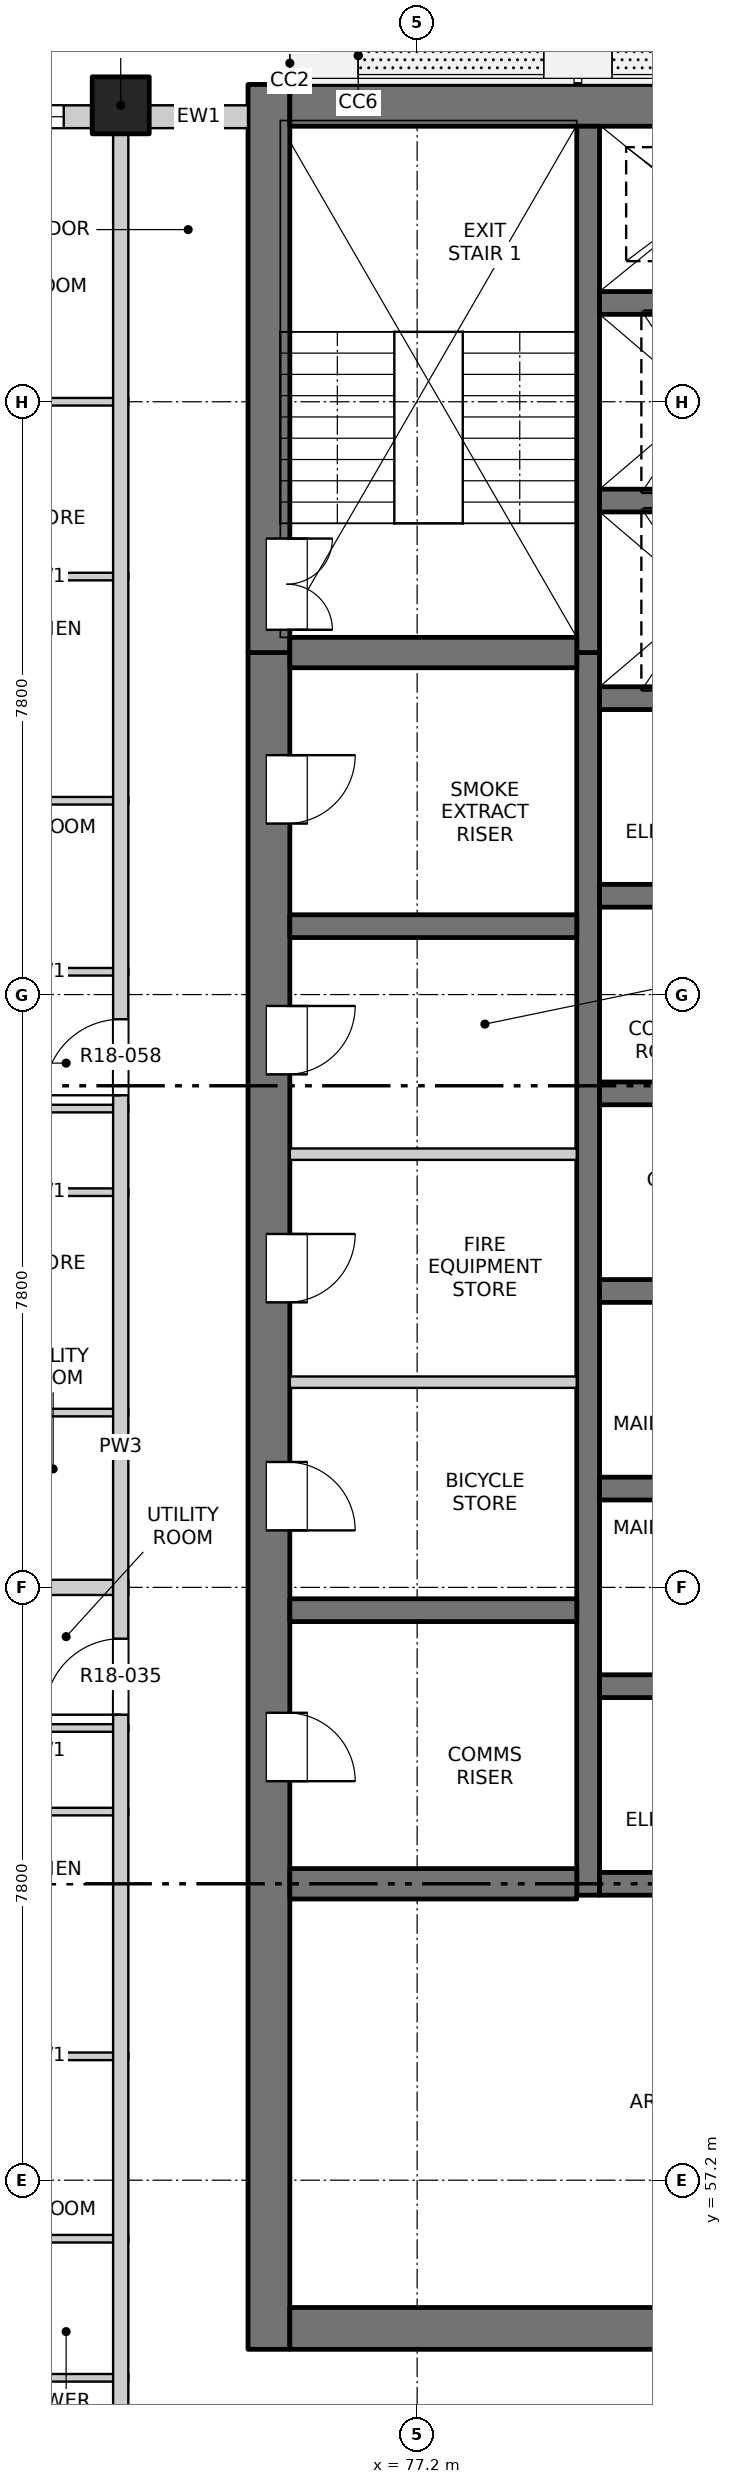
"""IFC4 building model, lengths in metres.
Left out: names, types, materials, properties, quantities, classifications, styles, units other than length and angle.
Written with IfcOpenShell. Run it as: python <this file> out.ifc"""

import sys

from ifc_helpers import new_model, si_unit, direction, frame, frame_2d, origin, origin_2d, place, context, subcontext, project, spatial, rectangle, extrude, element, fill, save


model = new_model("IFC4")
c1 = context("Model", 3, precision=1e-05, world=origin(), true_north=direction((0.0, 1.0)))
c2 = subcontext(c1, "Body", "Model", "MODEL_VIEW")
j1 = project(units=[si_unit("LENGTHUNIT", "METRE"), si_unit("PLANEANGLEUNIT", "RADIAN")], contexts=[c1])
p1 = place(None, origin())
s1 = spatial("IfcSite", under=j1, at=p1, CompositionType="ELEMENT")
p2 = place(p1, origin())
s2 = spatial("IfcBuilding", under=s1, at=p2, CompositionType="ELEMENT")
p3 = place(p2, frame((0.0, 0.0, 186.0)))
s3 = spatial("IfcBuildingStorey", under=s2, at=p3, CompositionType="ELEMENT", Elevation=186.0)
p4 = place(p3, frame((73.3, 84.5, -0.25), z_axis=(0.0, 0.0, 1.0), x_axis=(1.0, 0.0, 0.0)))
e1 = element("IfcColumn", 1, at=p4, inside=s3, PredefinedType="COLUMN", context=c2, shape_type="SweptSolid", body=[
    extrude(rectangle(XDim=0.75, YDim=0.75, at=origin_2d()), origin(), (0.0, 0.0, 1.0), 3.4),
])
p5 = place(p3, frame((75.25, 54.975, -0.25), z_axis=(0.0, 0.0, 1.0), x_axis=(0.0, 1.0, 0.0)))
e2 = element("IfcWall", 2, at=p5, inside=s3, PredefinedType="SOLIDWALL", context=c2, shape_type="SweptSolid", body=[
    extrude(rectangle(XDim=22.325, YDim=0.55, at=frame_2d((11.163, 0.0))), origin(), (0.0, 0.0, 1.0), 3.4),
])
p6 = place(p5, frame((7.475, 0.0, 0.25)))
e3 = element("IfcOpeningElement", 3, at=p6, cuts=e2, PredefinedType="OPENING", context=c2, shape_type="SweptSolid", body=[
    extrude(rectangle(XDim=0.9, YDim=2.1, at=frame_2d((0.45, 1.05))), frame((0.0, 0.285, 0.0), z_axis=(0.0, -1.0, 0.0), x_axis=(1.0, 0.0, 0.0)), (0.0, 0.0, 1.0), 0.57),
])
p7 = place(p5, frame((10.775, 0.0, 0.25)))
e4 = element("IfcOpeningElement", 4, at=p7, cuts=e2, PredefinedType="OPENING", context=c2, shape_type="SweptSolid", body=[
    extrude(rectangle(XDim=0.9, YDim=2.1, at=frame_2d((0.45, 1.05))), frame((0.0, 0.285, 0.0), z_axis=(0.0, -1.0, 0.0), x_axis=(1.0, 0.0, 0.0)), (0.0, 0.0, 1.0), 0.57),
])
p8 = place(p5, frame((13.775, 0.0, 0.25)))
e5 = element("IfcOpeningElement", 5, at=p8, cuts=e2, PredefinedType="OPENING", context=c2, shape_type="SweptSolid", body=[
    extrude(rectangle(XDim=0.9, YDim=2.1, at=frame_2d((0.45, 1.05))), frame((0.0, 0.285, 0.0), z_axis=(0.0, -1.0, 0.0), x_axis=(1.0, 0.0, 0.0)), (0.0, 0.0, 1.0), 0.57),
])
p9 = place(p5, frame((16.775, 0.0, 0.25)))
e6 = element("IfcOpeningElement", 6, at=p9, cuts=e2, PredefinedType="OPENING", context=c2, shape_type="SweptSolid", body=[
    extrude(rectangle(XDim=0.9, YDim=2.1, at=frame_2d((0.45, 1.05))), frame((0.0, 0.285, 0.0), z_axis=(0.0, -1.0, 0.0), x_axis=(1.0, 0.0, 0.0)), (0.0, 0.0, 1.0), 0.57),
])
p10 = place(p5, frame((20.075, 0.0, 0.25)))
e7 = element("IfcOpeningElement", 7, at=p10, cuts=e2, PredefinedType="OPENING", context=c2, shape_type="SweptSolid", body=[
    extrude(rectangle(XDim=0.9, YDim=2.1, at=frame_2d((0.45, 1.05))), frame((0.0, 0.285, 0.0), z_axis=(0.0, -1.0, 0.0), x_axis=(1.0, 0.0, 0.0)), (0.0, 0.0, 1.0), 0.57),
])
p11 = place(p3, frame((75.25, 77.3, -0.25), z_axis=(0.0, 0.0, 1.0), x_axis=(0.0, 1.0, 0.0)))
e8 = element("IfcWall", 8, at=p11, inside=s3, PredefinedType="SOLIDWALL", context=c2, shape_type="SweptSolid", body=[
    extrude(rectangle(XDim=7.475, YDim=0.55, at=frame_2d((3.737, 0.0))), origin(), (0.0, 0.0, 1.0), 3.4),
])
p12 = place(p11, frame((0.3, 0.0, 0.25)))
e9 = element("IfcOpeningElement", 9, at=p12, cuts=e8, PredefinedType="OPENING", context=c2, shape_type="SweptSolid", body=[
    extrude(rectangle(XDim=1.2, YDim=2.1, at=frame_2d((0.6, 1.05))), frame((0.0, 0.285, 0.0), z_axis=(0.0, -1.0, 0.0), x_axis=(1.0, 0.0, 0.0)), (0.0, 0.0, 1.0), 0.57),
])
p13 = place(p3, frame((75.525, 55.25, -0.25), z_axis=(0.0, 0.0, 1.0), x_axis=(1.0, 0.0, 0.0)))
e10 = element("IfcWall", 10, at=p13, inside=s3, PredefinedType="SOLIDWALL", context=c2, shape_type="SweptSolid", body=[
    extrude(rectangle(XDim=18.95, YDim=0.55, at=frame_2d((9.475, 0.0))), origin(), (0.0, 0.0, 1.0), 3.4),
])
p14 = place(p13, frame((8.725, 0.0, 0.25)))
e11 = element("IfcOpeningElement", 11, at=p14, cuts=e10, PredefinedType="OPENING", context=c2, shape_type="SweptSolid", body=[
    extrude(rectangle(XDim=1.5, YDim=2.1, at=frame_2d((0.75, 1.05))), frame((0.0, 0.285, 0.0), z_axis=(0.0, -1.0, 0.0), x_axis=(1.0, 0.0, 0.0)), (0.0, 0.0, 1.0), 0.57),
])
p15 = place(p3, frame((75.525, 84.5, -0.25), z_axis=(0.0, 0.0, 1.0), x_axis=(1.0, 0.0, 0.0)))
e12 = element("IfcWall", 12, at=p15, inside=s3, PredefinedType="SOLIDWALL", context=c2, shape_type="SweptSolid", body=[
    extrude(rectangle(XDim=18.95, YDim=0.55, at=frame_2d((9.475, 0.0))), origin(), (0.0, 0.0, 1.0), 3.4),
])
p16 = place(p3, frame((79.45, 60.95, -0.25), z_axis=(0.0, 0.0, 1.0), x_axis=(0.0, 1.0, 0.0)))
e13 = element("IfcWall", 13, at=p16, inside=s3, PredefinedType="SOLIDWALL", context=c2, shape_type="SweptSolid", body=[
    extrude(rectangle(XDim=16.35, YDim=0.3, at=frame_2d((8.175, 0.0))), origin(), (0.0, 0.0, 1.0), 3.4),
])
p17 = place(p3, frame((79.45, 77.3, -0.25), z_axis=(0.0, 0.0, 1.0), x_axis=(0.0, 1.0, 0.0)))
e14 = element("IfcWall", 14, at=p17, inside=s3, PredefinedType="SOLIDWALL", context=c2, shape_type="SweptSolid", body=[
    extrude(rectangle(XDim=6.925, YDim=0.3, at=frame_2d((3.462, 0.0))), origin(), (0.0, 0.0, 1.0), 3.4),
])
for number, where, z_axis, x_axis in (
    (15, (79.6, 61.1, -0.25), (0.0, 0.0, 1.0), (1.0, 0.0, 0.0)),
    (16, (79.6, 63.7, -0.25), (0.0, 0.0, 1.0), (1.0, 0.0, 0.0)),
    (17, (79.6, 66.3, -0.25), (0.0, 0.0, 1.0), (1.0, 0.0, 0.0)),
    (18, (79.6, 68.9, -0.25), (0.0, 0.0, 1.0), (1.0, 0.0, 0.0)),
    (19, (79.6, 71.5, -0.25), (0.0, 0.0, 1.0), (1.0, 0.0, 0.0)),
    (20, (79.6, 74.1, -0.25), (0.0, 0.0, 1.0), (1.0, 0.0, 0.0)),
    (21, (79.6, 76.7, -0.25), (0.0, 0.0, 1.0), (1.0, 0.0, 0.0)),
    (22, (79.6, 79.3, -0.25), (0.0, 0.0, 1.0), (1.0, 0.0, 0.0)),
    (23, (79.6, 81.9, -0.25), (0.0, 0.0, 1.0), (1.0, 0.0, 0.0)),
):
    element("IfcWall", number, at=place(p3, frame(where, z_axis=z_axis, x_axis=x_axis)), inside=s3, PredefinedType="SOLIDWALL", context=c2, shape_type="SweptSolid", body=[
        extrude(rectangle(XDim=3.0, YDim=0.3, at=frame_2d((1.5, 0.0))), origin(), (0.0, 0.0, 1.0), 3.4),
    ])
p18 = place(p3, frame((75.525, 61.1, -0.25), z_axis=(0.0, 0.0, 1.0), x_axis=(1.0, 0.0, 0.0)))
e24 = element("IfcWall", 24, at=p18, inside=s3, PredefinedType="SOLIDWALL", context=c2, shape_type="SweptSolid", body=[
    extrude(rectangle(XDim=3.775, YDim=0.4, at=frame_2d((1.888, 0.0))), origin(), (0.0, 0.0, 1.0), 3.4),
])
for number, where, z_axis, x_axis in (
    (25, (75.525, 64.7, -0.25), (0.0, 0.0, 1.0), (1.0, 0.0, 0.0)),
    (26, (75.525, 73.7, -0.25), (0.0, 0.0, 1.0), (1.0, 0.0, 0.0)),
):
    element("IfcWall", number, at=place(p3, frame(where, z_axis=z_axis, x_axis=x_axis)), inside=s3, PredefinedType="SOLIDWALL", context=c2, shape_type="SweptSolid", body=[
        extrude(rectangle(XDim=3.775, YDim=0.3, at=frame_2d((1.888, 0.0))), origin(), (0.0, 0.0, 1.0), 3.4),
    ])
p19 = place(p3, frame((75.525, 77.3, -0.25), z_axis=(0.0, 0.0, 1.0), x_axis=(1.0, 0.0, 0.0)))
e27 = element("IfcWall", 27, at=p19, inside=s3, PredefinedType="SOLIDWALL", context=c2, shape_type="SweptSolid", body=[
    extrude(rectangle(XDim=3.775, YDim=0.4, at=frame_2d((1.888, 0.0))), origin(), (0.0, 0.0, 1.0), 3.4),
])
p20 = place(p3, frame((69.4, 84.35, 0.0), z_axis=(0.0, 0.0, 1.0), x_axis=(1.0, 0.0, 0.0)))
e28 = element("IfcWall", 28, at=p20, inside=s3, PredefinedType="SOLIDWALL", context=c2, shape_type="SweptSolid", body=[
    extrude(rectangle(XDim=3.525, YDim=0.3, at=frame_2d((1.763, 0.0))), origin(), (0.0, 0.0, 1.0), 2.7),
])
p21 = place(p20, frame((0.75, 0.0, 0.9)))
e29 = element("IfcOpeningElement", 29, at=p21, cuts=e28, PredefinedType="OPENING", context=c2, shape_type="SweptSolid", body=[
    extrude(rectangle(XDim=2.4, YDim=1.8, at=frame_2d((1.2, 0.9))), frame((0.0, 0.16, 0.0), z_axis=(0.0, -1.0, 0.0), x_axis=(1.0, 0.0, 0.0)), (0.0, 0.0, 1.0), 0.32),
])
p22 = place(p3, frame((73.675, 84.35, 0.0), z_axis=(0.0, 0.0, 1.0), x_axis=(1.0, 0.0, 0.0)))
e30 = element("IfcWall", 30, at=p22, inside=s3, PredefinedType="SOLIDWALL", context=c2, shape_type="SweptSolid", body=[
    extrude(rectangle(XDim=1.3, YDim=0.3, at=frame_2d((0.65, 0.0))), origin(), (0.0, 0.0, 1.0), 2.7),
])
for number, where, z_axis, x_axis in (
    (31, (71.18, 54.6, 0.0), (0.0, 0.0, 1.0), (1.0, 0.0, 0.0)),
    (32, (71.18, 56.43, 0.0), (0.0, 0.0, 1.0), (1.0, 0.0, 0.0)),
    (33, (71.18, 58.83, 0.0), (0.0, 0.0, 1.0), (1.0, 0.0, 0.0)),
    (34, (71.18, 62.05, 0.0), (0.0, 0.0, 1.0), (1.0, 0.0, 0.0)),
    (35, (71.18, 63.15, 0.0), (0.0, 0.0, 1.0), (1.0, 0.0, 0.0)),
):
    element("IfcWall", number, at=place(p3, frame(where, z_axis=z_axis, x_axis=x_axis)), inside=s3, PredefinedType="PARTITIONING", context=c2, shape_type="SweptSolid", body=[
        extrude(rectangle(XDim=2.22, YDim=0.1, at=frame_2d((1.11, 0.0))), origin(), (0.0, 0.0, 1.0), 3.15),
    ])
p23 = place(p3, frame((65.8, 65.0, 0.0), z_axis=(0.0, 0.0, 1.0), x_axis=(1.0, 0.0, 0.0)))
e36 = element("IfcWall", 36, at=p23, inside=s3, PredefinedType="PARTITIONING", context=c2, shape_type="SweptSolid", body=[
    extrude(rectangle(XDim=7.6, YDim=0.2, at=frame_2d((3.8, 0.0))), origin(), (0.0, 0.0, 1.0), 3.15),
])
p24 = place(p3, frame((71.18, 67.3, 0.0), z_axis=(0.0, 0.0, 1.0), x_axis=(1.0, 0.0, 0.0)))
e37 = element("IfcWall", 37, at=p24, inside=s3, PredefinedType="PARTITIONING", context=c2, shape_type="SweptSolid", body=[
    extrude(rectangle(XDim=2.22, YDim=0.1, at=frame_2d((1.11, 0.0))), origin(), (0.0, 0.0, 1.0), 3.15),
])
p25 = place(p3, frame((75.525, 67.7, 0.0), z_axis=(0.0, 0.0, 1.0), x_axis=(1.0, 0.0, 0.0)))
e38 = element("IfcWall", 38, at=p25, inside=s3, PredefinedType="PARTITIONING", context=c2, shape_type="SweptSolid", body=[
    extrude(rectangle(XDim=3.775, YDim=0.15, at=frame_2d((1.887, 0.0))), origin(), (0.0, 0.0, 1.0), 3.15),
])
p26 = place(p3, frame((71.18, 70.2, 0.0), z_axis=(0.0, 0.0, 1.0), x_axis=(1.0, 0.0, 0.0)))
e39 = element("IfcWall", 39, at=p26, inside=s3, PredefinedType="PARTITIONING", context=c2, shape_type="SweptSolid", body=[
    extrude(rectangle(XDim=2.22, YDim=0.1, at=frame_2d((1.11, 0.0))), origin(), (0.0, 0.0, 1.0), 3.15),
])
p27 = place(p3, frame((75.525, 70.7, 0.0), z_axis=(0.0, 0.0, 1.0), x_axis=(1.0, 0.0, 0.0)))
e40 = element("IfcWall", 40, at=p27, inside=s3, PredefinedType="PARTITIONING", context=c2, shape_type="SweptSolid", body=[
    extrude(rectangle(XDim=3.775, YDim=0.15, at=frame_2d((1.887, 0.0))), origin(), (0.0, 0.0, 1.0), 3.15),
])
for number, where, z_axis, x_axis in (
    (41, (71.18, 71.3, 0.0), (0.0, 0.0, 1.0), (1.0, 0.0, 0.0)),
    (42, (71.18, 73.1, 0.0), (0.0, 0.0, 1.0), (1.0, 0.0, 0.0)),
    (43, (71.18, 75.35, 0.0), (0.0, 0.0, 1.0), (1.0, 0.0, 0.0)),
    (44, (71.18, 78.3, 0.0), (0.0, 0.0, 1.0), (1.0, 0.0, 0.0)),
):
    element("IfcWall", number, at=place(p3, frame(where, z_axis=z_axis, x_axis=x_axis)), inside=s3, PredefinedType="PARTITIONING", context=c2, shape_type="SweptSolid", body=[
        extrude(rectangle(XDim=2.22, YDim=0.1, at=frame_2d((1.11, 0.0))), origin(), (0.0, 0.0, 1.0), 3.15),
    ])
p28 = place(p3, frame((65.8, 80.6, 0.0), z_axis=(0.0, 0.0, 1.0), x_axis=(1.0, 0.0, 0.0)))
e45 = element("IfcWall", 45, at=p28, inside=s3, PredefinedType="PARTITIONING", context=c2, shape_type="SweptSolid", body=[
    extrude(rectangle(XDim=7.6, YDim=0.1, at=frame_2d((3.8, 0.0))), origin(), (0.0, 0.0, 1.0), 3.15),
])
p29 = place(p28, frame((4.14, 0.0, 0.0)))
e46 = element("IfcOpeningElement", 46, at=p29, cuts=e45, PredefinedType="OPENING", context=c2, shape_type="SweptSolid", body=[
    extrude(rectangle(XDim=0.9, YDim=2.1, at=frame_2d((0.45, 1.05))), frame((0.0, 0.06, 0.0), z_axis=(0.0, -1.0, 0.0), x_axis=(1.0, 0.0, 0.0)), (0.0, 0.0, 1.0), 0.12),
])
p30 = place(p3, frame((73.3, 49.5, 0.0), z_axis=(0.0, 0.0, 1.0), x_axis=(0.0, 1.0, 0.0)))
e47 = element("IfcWall", 47, at=p30, inside=s3, PredefinedType="PARTITIONING", context=c2, shape_type="SweptSolid", body=[
    extrude(rectangle(XDim=34.7, YDim=0.2, at=frame_2d((17.35, 0.0))), origin(), (0.0, 0.0, 1.0), 3.15),
])
p31 = place(p30, frame((13.825, 0.0, 0.0)))
e48 = element("IfcOpeningElement", 48, at=p31, cuts=e47, PredefinedType="OPENING", context=c2, shape_type="SweptSolid", body=[
    extrude(rectangle(XDim=1.0, YDim=2.1, at=frame_2d((0.5, 1.05))), frame((0.0, 0.11, 0.0), z_axis=(0.0, -1.0, 0.0), x_axis=(1.0, 0.0, 0.0)), (0.0, 0.0, 1.0), 0.22),
])
p32 = place(p30, frame((21.975, 0.0, 0.0)))
e49 = element("IfcOpeningElement", 49, at=p32, cuts=e47, PredefinedType="OPENING", context=c2, shape_type="SweptSolid", body=[
    extrude(rectangle(XDim=1.0, YDim=2.1, at=frame_2d((0.5, 1.05))), frame((0.0, 0.11, 0.0), z_axis=(0.0, -1.0, 0.0), x_axis=(1.0, 0.0, 0.0)), (0.0, 0.0, 1.0), 0.22),
])
p33 = place(p21, origin())
e50 = element("IfcWindow", 50, at=p33, inside=s3, PartitioningType="DOUBLE_PANEL_VERTICAL", PredefinedType="WINDOW", context=c2, shape_type="SweptSolid", body=[
    extrude(rectangle(XDim=2.4, YDim=1.8, at=frame_2d((1.2, 0.9))), frame((0.0, 0.03, 0.0), z_axis=(0.0, -1.0, 0.0), x_axis=(1.0, 0.0, 0.0)), (0.0, 0.0, 1.0), 0.06),
])
fill(e29, e50)
p34 = place(p6, origin())
e51 = element("IfcDoor", 51, at=p34, inside=s3, OperationType="SINGLE_SWING_RIGHT", PredefinedType="DOOR", context=c2, shape_type="SweptSolid", body=[
    extrude(rectangle(XDim=0.9, YDim=2.1, at=frame_2d((0.45, 1.05))), frame((0.0, -0.21, 0.0), z_axis=(0.0, -1.0, 0.0), x_axis=(1.0, 0.0, 0.0)), (0.0, 0.0, 1.0), 0.05),
])
fill(e3, e51)
p35 = place(p31, origin())
e52 = element("IfcDoor", 52, at=p35, inside=s3, OperationType="SINGLE_SWING_RIGHT", PredefinedType="DOOR", context=c2, shape_type="SweptSolid", body=[
    extrude(rectangle(XDim=1.0, YDim=2.1, at=frame_2d((0.5, 1.05))), frame((0.0, 0.025, 0.0), z_axis=(0.0, -1.0, 0.0), x_axis=(1.0, 0.0, 0.0)), (0.0, 0.0, 1.0), 0.05),
])
fill(e48, e52)
p36 = place(p7, origin())
e53 = element("IfcDoor", 53, at=p36, inside=s3, OperationType="SINGLE_SWING_RIGHT", PredefinedType="DOOR", context=c2, shape_type="SweptSolid", body=[
    extrude(rectangle(XDim=0.9, YDim=2.1, at=frame_2d((0.45, 1.05))), frame((0.0, -0.21, 0.0), z_axis=(0.0, -1.0, 0.0), x_axis=(1.0, 0.0, 0.0)), (0.0, 0.0, 1.0), 0.05),
])
fill(e4, e53)
p37 = place(p8, origin())
e54 = element("IfcDoor", 54, at=p37, inside=s3, OperationType="SINGLE_SWING_LEFT", PredefinedType="DOOR", context=c2, shape_type="SweptSolid", body=[
    extrude(rectangle(XDim=0.9, YDim=2.1, at=frame_2d((0.45, 1.05))), frame((0.0, -0.21, 0.0), z_axis=(0.0, -1.0, 0.0), x_axis=(1.0, 0.0, 0.0)), (0.0, 0.0, 1.0), 0.05),
])
fill(e5, e54)
p38 = place(p32, origin())
e55 = element("IfcDoor", 55, at=p38, inside=s3, OperationType="SINGLE_SWING_RIGHT", PredefinedType="DOOR", context=c2, shape_type="SweptSolid", body=[
    extrude(rectangle(XDim=1.0, YDim=2.1, at=frame_2d((0.5, 1.05))), frame((0.0, 0.025, 0.0), z_axis=(0.0, -1.0, 0.0), x_axis=(1.0, 0.0, 0.0)), (0.0, 0.0, 1.0), 0.05),
])
fill(e49, e55)
p39 = place(p9, origin())
e56 = element("IfcDoor", 56, at=p39, inside=s3, OperationType="SINGLE_SWING_LEFT", PredefinedType="DOOR", context=c2, shape_type="SweptSolid", body=[
    extrude(rectangle(XDim=0.9, YDim=2.1, at=frame_2d((0.45, 1.05))), frame((0.0, -0.21, 0.0), z_axis=(0.0, -1.0, 0.0), x_axis=(1.0, 0.0, 0.0)), (0.0, 0.0, 1.0), 0.05),
])
fill(e6, e56)
p40 = place(p10, origin())
e57 = element("IfcDoor", 57, at=p40, inside=s3, OperationType="SINGLE_SWING_LEFT", PredefinedType="DOOR", context=c2, shape_type="SweptSolid", body=[
    extrude(rectangle(XDim=0.9, YDim=2.1, at=frame_2d((0.45, 1.05))), frame((0.0, -0.21, 0.0), z_axis=(0.0, -1.0, 0.0), x_axis=(1.0, 0.0, 0.0)), (0.0, 0.0, 1.0), 0.05),
])
fill(e7, e57)
p41 = place(p12, origin())
e58 = element("IfcDoor", 58, at=p41, inside=s3, OperationType="DOUBLE_DOOR_SINGLE_SWING", PredefinedType="DOOR", context=c2, shape_type="SweptSolid", body=[
    extrude(rectangle(XDim=1.2, YDim=2.1, at=frame_2d((0.6, 1.05))), frame((0.0, -0.21, 0.0), z_axis=(0.0, -1.0, 0.0), x_axis=(1.0, 0.0, 0.0)), (0.0, 0.0, 1.0), 0.05),
])
fill(e9, e58)
save(model, sys.argv[1])
